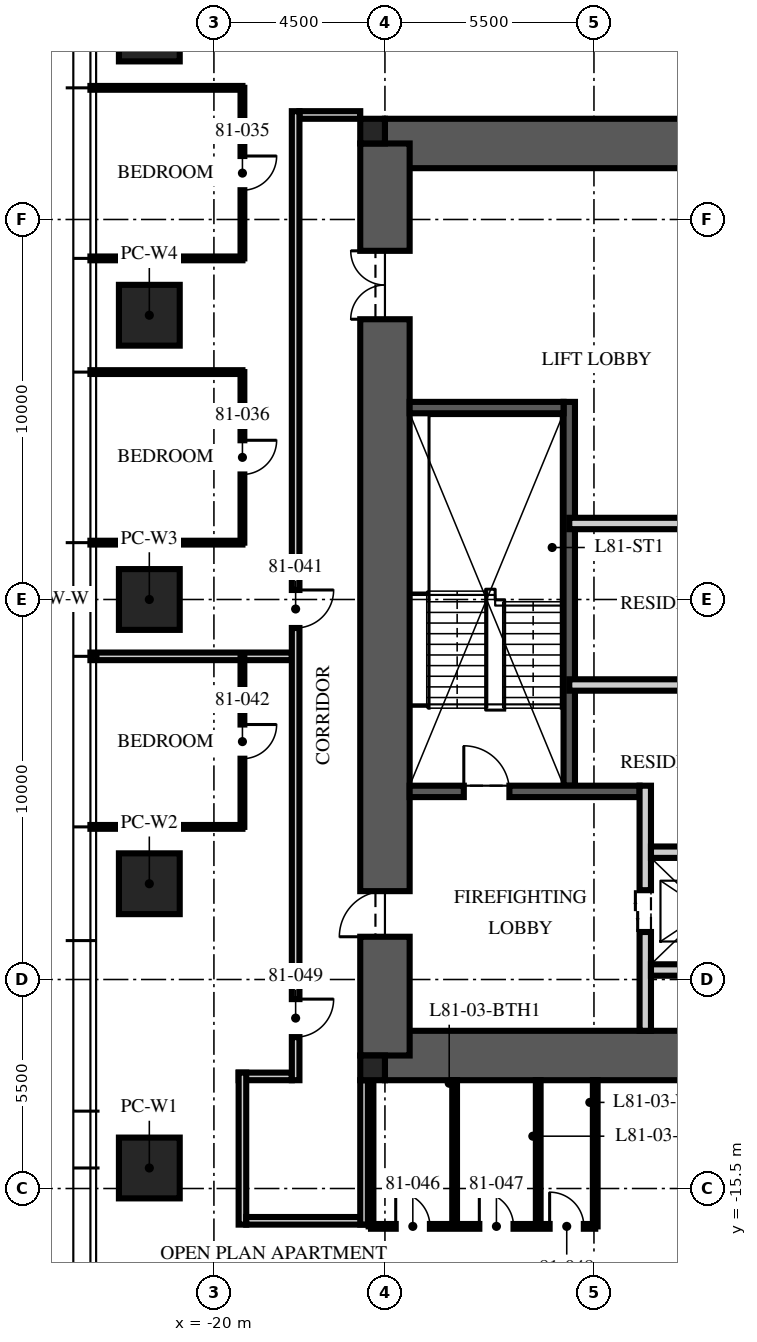
"""IFC4 building model, lengths in metres.
Left out: names, types, materials, properties, quantities, classifications, styles, units other than length and angle.
Written with IfcOpenShell. Run it as: python <this file> out.ifc"""

import sys

from ifc_helpers import new_model, si_unit, direction, frame, frame_2d, origin, origin_2d, place, context, subcontext, project, spatial, rectangle, extrude, element, fill, save


model = new_model("IFC4")
c1 = context("Model", 3, precision=1e-05, world=origin(), true_north=direction((0.0, 1.0)))
c2 = subcontext(c1, "Body", "Model", "MODEL_VIEW")
j1 = project(units=[si_unit("LENGTHUNIT", "METRE"), si_unit("PLANEANGLEUNIT", "RADIAN")], contexts=[c1])
p1 = place(None, origin())
s1 = spatial("IfcSite", under=j1, at=p1, CompositionType="ELEMENT")
p2 = place(p1, origin())
s2 = spatial("IfcBuilding", under=s1, at=p2, CompositionType="ELEMENT")
p3 = place(p2, frame((0.0, 0.0, 323.25)))
s3 = spatial("IfcBuildingStorey", under=s2, at=p3, CompositionType="ELEMENT", Elevation=323.25)
for number, where, z_axis, x_axis in (
    (1, (-15.5, 12.0, -0.25), (0.0, 0.0, 1.0), (1.0, 0.0, 0.0)),
    (2, (-15.5, -12.0, -0.25), (0.0, 0.0, 1.0), (1.0, 0.0, 0.0)),
):
    element("IfcWall", number, at=place(p3, frame(where, z_axis=z_axis, x_axis=x_axis)), inside=s3, PredefinedType="SHEAR", context=c2, shape_type="SweptSolid", body=[
        extrude(rectangle(XDim=31.0, YDim=1.3, at=frame_2d((15.5, 0.0))), origin(), (0.0, 0.0, 1.0), 3.75),
    ])
p4 = place(p3, frame((-15.5, -12.0, -0.25), z_axis=(0.0, 0.0, 1.0), x_axis=(0.0, 1.0, 0.0)))
e3 = element("IfcWall", 3, at=p4, inside=s3, PredefinedType="SHEAR", context=c2, shape_type="SweptSolid", body=[
    extrude(rectangle(XDim=24.0, YDim=1.3, at=frame_2d((12.0, 0.0))), origin(), (0.0, 0.0, 1.0), 3.75),
])
p5 = place(p4, frame((3.125, 0.0, 0.25)))
e4 = element("IfcOpeningElement", 4, at=p5, cuts=e3, PredefinedType="OPENING", context=c2, shape_type="SweptSolid", body=[
    extrude(rectangle(XDim=1.2, YDim=2.1, at=frame_2d((0.6, 1.05))), frame((0.0, 0.66, 0.0), z_axis=(0.0, -1.0, 0.0), x_axis=(1.0, 0.0, 0.0)), (0.0, 0.0, 1.0), 1.32),
])
p6 = place(p4, frame((19.375, 0.0, 0.25)))
e5 = element("IfcOpeningElement", 5, at=p6, cuts=e3, PredefinedType="OPENING", context=c2, shape_type="SweptSolid", body=[
    extrude(rectangle(XDim=1.8, YDim=2.1, at=frame_2d((0.9, 1.05))), frame((0.0, 0.66, 0.0), z_axis=(0.0, -1.0, 0.0), x_axis=(1.0, 0.0, 0.0)), (0.0, 0.0, 1.0), 1.32),
])
for number, where, z_axis, x_axis in (
    (6, (-15.825, 12.325, -0.25), (0.0, 0.0, 1.0), (1.0, 0.0, 0.0)),
    (7, (-15.825, -12.325, -0.25), (0.0, 0.0, 1.0), (1.0, 0.0, 0.0)),
):
    element("IfcColumn", number, at=place(p3, frame(where, z_axis=z_axis, x_axis=x_axis)), inside=s3, PredefinedType="COLUMN", context=c2, shape_type="SweptSolid", body=[
        extrude(rectangle(XDim=0.65, YDim=0.65, at=origin_2d()), origin(), (0.0, 0.0, 1.0), 3.75),
    ])
for number, where, z_axis, x_axis in (
    (8, (-21.7, -14.96, 0.0), (0.0, 0.0, 1.0), (0.0, 1.0, 0.0)),
    (9, (-21.7, -7.48, 0.0), (0.0, 0.0, 1.0), (0.0, 1.0, 0.0)),
    (10, (-21.7, 0.0, 0.0), (0.0, 0.0, 1.0), (0.0, 1.0, 0.0)),
    (11, (-21.7, 7.48, 0.0), (0.0, 0.0, 1.0), (0.0, 1.0, 0.0)),
    (12, (-21.7, 14.96, 0.0), (0.0, 0.0, 1.0), (0.0, 1.0, 0.0)),
):
    element("IfcColumn", number, at=place(p3, frame(where, z_axis=z_axis, x_axis=x_axis)), inside=s3, PredefinedType="COLUMN", context=c2, shape_type="SweptSolid", body=[
        extrude(rectangle(XDim=1.6, YDim=1.6, at=origin_2d()), origin(), (0.0, 0.0, 1.0), 3.75),
    ])
p7 = place(p3, frame((-10.65, -4.9, 0.0), z_axis=(0.0, 0.0, 1.0), x_axis=(0.0, 1.0, 0.0)))
e13 = element("IfcWall", 13, at=p7, inside=s3, PredefinedType="SOLIDWALL", context=c2, shape_type="SweptSolid", body=[
    extrude(rectangle(XDim=10.1, YDim=0.3, at=frame_2d((5.05, 0.0))), origin(), (0.0, 0.0, 1.0), 3.5),
])
p8 = place(p3, frame((-14.85, -5.05, 0.0), z_axis=(0.0, 0.0, 1.0), x_axis=(1.0, 0.0, 0.0)))
e14 = element("IfcWall", 14, at=p8, inside=s3, PredefinedType="SOLIDWALL", context=c2, shape_type="SweptSolid", body=[
    extrude(rectangle(XDim=6.05, YDim=0.3, at=frame_2d((3.025, 0.0))), origin(), (0.0, 0.0, 1.0), 3.5),
])
p9 = place(p8, frame((1.425, 0.0, 0.0)))
e15 = element("IfcOpeningElement", 15, at=p9, cuts=e14, PredefinedType="OPENING", context=c2, shape_type="SweptSolid", body=[
    extrude(rectangle(XDim=1.2, YDim=2.1, at=frame_2d((0.6, 1.05))), frame((0.0, 0.16, 0.0), z_axis=(0.0, -1.0, 0.0), x_axis=(1.0, 0.0, 0.0)), (0.0, 0.0, 1.0), 0.32),
])
p10 = place(p3, frame((-14.85, 5.05, 0.0), z_axis=(0.0, 0.0, 1.0), x_axis=(1.0, 0.0, 0.0)))
e16 = element("IfcWall", 16, at=p10, inside=s3, PredefinedType="SOLIDWALL", context=c2, shape_type="SweptSolid", body=[
    extrude(rectangle(XDim=4.05, YDim=0.3, at=frame_2d((2.025, 0.0))), origin(), (0.0, 0.0, 1.0), 3.5),
])
p11 = place(p3, frame((-8.65, -11.35, 0.0), z_axis=(0.0, 0.0, 1.0), x_axis=(0.0, 1.0, 0.0)))
e17 = element("IfcWall", 17, at=p11, inside=s3, PredefinedType="PARTITIONING", context=c2, shape_type="SweptSolid", body=[
    extrude(rectangle(XDim=6.45, YDim=0.3, at=frame_2d((3.225, 0.0))), origin(), (0.0, 0.0, 1.0), 3.5),
])
p12 = place(p11, frame((2.6, 0.0, 0.0)))
e18 = element("IfcOpeningElement", 18, at=p12, cuts=e17, PredefinedType="OPENING", context=c2, shape_type="SweptSolid", body=[
    extrude(rectangle(XDim=1.1, YDim=2.1, at=frame_2d((0.55, 1.05))), frame((0.0, 0.16, 0.0), z_axis=(0.0, -1.0, 0.0), x_axis=(1.0, 0.0, 0.0)), (0.0, 0.0, 1.0), 0.32),
])
p13 = place(p3, frame((-8.5, -6.65, 0.0), z_axis=(0.0, 0.0, 1.0), x_axis=(1.0, 0.0, 0.0)))
e19 = element("IfcWall", 19, at=p13, inside=s3, PredefinedType="PARTITIONING", context=c2, shape_type="SweptSolid", body=[
    extrude(rectangle(XDim=17.0, YDim=0.3, at=frame_2d((8.5, 0.0))), origin(), (0.0, 0.0, 1.0), 3.5),
])
p14 = place(p13, frame((7.8, 0.0, 0.0)))
e20 = element("IfcOpeningElement", 20, at=p14, cuts=e19, PredefinedType="OPENING", context=c2, shape_type="SweptSolid", body=[
    extrude(rectangle(XDim=1.3, YDim=2.4, at=frame_2d((0.65, 1.2))), frame((0.0, 0.16, 0.0), z_axis=(0.0, -1.0, 0.0), x_axis=(1.0, 0.0, 0.0)), (0.0, 0.0, 1.0), 0.32),
])
p15 = place(p13, frame((5.65, 0.0, 0.0)))
e21 = element("IfcOpeningElement", 21, at=p15, cuts=e19, PredefinedType="OPENING", context=c2, shape_type="SweptSolid", body=[
    extrude(rectangle(XDim=0.9, YDim=2.1, at=frame_2d((0.45, 1.05))), frame((0.0, 0.16, 0.0), z_axis=(0.0, -1.0, 0.0), x_axis=(1.0, 0.0, 0.0)), (0.0, 0.0, 1.0), 0.32),
])
p16 = place(p13, frame((10.4, 0.0, 0.0)))
e22 = element("IfcOpeningElement", 22, at=p16, cuts=e19, PredefinedType="OPENING", context=c2, shape_type="SweptSolid", body=[
    extrude(rectangle(XDim=0.9, YDim=2.1, at=frame_2d((0.45, 1.05))), frame((0.0, 0.16, 0.0), z_axis=(0.0, -1.0, 0.0), x_axis=(1.0, 0.0, 0.0)), (0.0, 0.0, 1.0), 0.32),
])
p17 = place(p3, frame((-8.5, -9.75, 0.0), z_axis=(0.0, 0.0, 1.0), x_axis=(1.0, 0.0, 0.0)))
e23 = element("IfcWall", 23, at=p17, inside=s3, PredefinedType="PARTITIONING", context=c2, shape_type="SweptSolid", body=[
    extrude(rectangle(XDim=2.9, YDim=0.3, at=frame_2d((1.45, 0.0))), origin(), (0.0, 0.0, 1.0), 3.5),
])
p18 = place(p3, frame((-10.65, 2.0, 0.0), z_axis=(0.0, 0.0, 1.0), x_axis=(1.0, 0.0, 0.0)))
e24 = element("IfcWall", 24, at=p18, inside=s3, PredefinedType="PARTITIONING", context=c2, shape_type="SweptSolid", body=[
    extrude(rectangle(XDim=21.3, YDim=0.3, at=frame_2d((10.65, 0.0))), origin(), (0.0, 0.0, 1.0), 3.5),
])
p19 = place(p18, frame((10.05, 0.0, 0.0)))
e25 = element("IfcOpeningElement", 25, at=p19, cuts=e24, PredefinedType="OPENING", context=c2, shape_type="SweptSolid", body=[
    extrude(rectangle(XDim=1.2, YDim=2.1, at=frame_2d((0.6, 1.05))), frame((0.0, 0.16, 0.0), z_axis=(0.0, -1.0, 0.0), x_axis=(1.0, 0.0, 0.0)), (0.0, 0.0, 1.0), 0.32),
])
p20 = place(p18, frame((18.942, 0.0, 0.0)))
e26 = element("IfcOpeningElement", 26, at=p20, cuts=e24, PredefinedType="OPENING", context=c2, shape_type="SweptSolid", body=[
    extrude(rectangle(XDim=0.9, YDim=2.1, at=frame_2d((0.45, 1.05))), frame((0.0, 0.16, 0.0), z_axis=(0.0, -1.0, 0.0), x_axis=(1.0, 0.0, 0.0)), (0.0, 0.0, 1.0), 0.32),
])
p21 = place(p3, frame((-10.65, -2.25, 0.0), z_axis=(0.0, 0.0, 1.0), x_axis=(1.0, 0.0, 0.0)))
e27 = element("IfcWall", 27, at=p21, inside=s3, PredefinedType="PARTITIONING", context=c2, shape_type="SweptSolid", body=[
    extrude(rectangle(XDim=7.35, YDim=0.3, at=frame_2d((3.675, 0.0))), origin(), (0.0, 0.0, 1.0), 3.5),
])
p22 = place(p3, frame((-17.95, -12.55, 0.0), z_axis=(0.0, 0.0, 1.0), x_axis=(-1.0, 0.0, 0.0)))
e28 = element("IfcWall", 28, at=p22, inside=s3, PredefinedType="PARTITIONING", context=c2, shape_type="SweptSolid", body=[
    extrude(rectangle(XDim=1.4, YDim=0.2, at=frame_2d((0.7, 0.0))), origin(), (0.0, 0.0, 1.0), 3.5),
])
p23 = place(p3, frame((-19.25, -12.45, 0.0), z_axis=(0.0, 0.0, 1.0), x_axis=(0.0, -1.0, 0.0)))
e29 = element("IfcWall", 29, at=p23, inside=s3, PredefinedType="PARTITIONING", context=c2, shape_type="SweptSolid", body=[
    extrude(rectangle(XDim=4.0, YDim=0.2, at=frame_2d((2.0, 0.0))), origin(), (0.0, 0.0, 1.0), 2.9),
])
p24 = place(p3, frame((-19.15, -16.35, 0.0), z_axis=(0.0, 0.0, 1.0), x_axis=(1.0, 0.0, 0.0)))
e30 = element("IfcWall", 30, at=p24, inside=s3, PredefinedType="PARTITIONING", context=c2, shape_type="SweptSolid", body=[
    extrude(rectangle(XDim=3.2, YDim=0.2, at=frame_2d((1.6, 0.0))), origin(), (0.0, 0.0, 1.0), 2.6),
])
p25 = place(p3, frame((-16.05, -16.45, 0.0), z_axis=(0.0, 0.0, 1.0), x_axis=(0.0, 1.0, 0.0)))
e31 = element("IfcWall", 31, at=p25, inside=s3, PredefinedType="PARTITIONING", context=c2, shape_type="SweptSolid", body=[
    extrude(rectangle(XDim=3.8, YDim=0.2, at=frame_2d((1.9, 0.0))), origin(), (0.0, 0.0, 1.0), 2.6),
])
p26 = place(p3, frame((-16.15, 12.75, 0.0), z_axis=(0.0, 0.0, 1.0), x_axis=(-1.0, 0.0, 0.0)))
e32 = element("IfcWall", 32, at=p26, inside=s3, PredefinedType="PARTITIONING", context=c2, shape_type="SweptSolid", body=[
    extrude(rectangle(XDim=1.6, YDim=0.2, at=frame_2d((0.8, 0.0))), origin(), (0.0, 0.0, 1.0), 2.6),
])
for number, where, z_axis, x_axis in (
    (33, (-19.25, 13.464, 0.0), (0.0, 0.0, 1.0), (-1.0, 0.0, 0.0)),
    (34, (-19.25, 8.976, 0.0), (0.0, 0.0, 1.0), (-1.0, 0.0, 0.0)),
    (35, (-19.25, 5.984, 0.0), (0.0, 0.0, 1.0), (-1.0, 0.0, 0.0)),
    (36, (-19.25, 1.496, 0.0), (0.0, 0.0, 1.0), (-1.0, 0.0, 0.0)),
):
    element("IfcWall", number, at=place(p3, frame(where, z_axis=z_axis, x_axis=x_axis)), inside=s3, PredefinedType="PARTITIONING", context=c2, shape_type="SweptSolid", body=[
        extrude(rectangle(XDim=4.0, YDim=0.1, at=frame_2d((2.0, 0.0))), origin(), (0.0, 0.0, 1.0), 3.01),
    ])
p27 = place(p3, frame((-17.95, -1.496, 0.0), z_axis=(0.0, 0.0, 1.0), x_axis=(-1.0, 0.0, 0.0)))
e37 = element("IfcWall", 37, at=p27, inside=s3, PredefinedType="PARTITIONING", context=c2, shape_type="SweptSolid", body=[
    extrude(rectangle(XDim=5.3, YDim=0.2, at=frame_2d((2.65, 0.0))), origin(), (0.0, 0.0, 1.0), 3.01),
])
p28 = place(p3, frame((-19.25, -5.984, 0.0), z_axis=(0.0, 0.0, 1.0), x_axis=(-1.0, 0.0, 0.0)))
e38 = element("IfcWall", 38, at=p28, inside=s3, PredefinedType="PARTITIONING", context=c2, shape_type="SweptSolid", body=[
    extrude(rectangle(XDim=4.0, YDim=0.1, at=frame_2d((2.0, 0.0))), origin(), (0.0, 0.0, 1.0), 3.01),
])
p29 = place(p3, frame((-19.25, 13.464, 0.0), z_axis=(0.0, 0.0, 1.0), x_axis=(0.0, -1.0, 0.0)))
e39 = element("IfcWall", 39, at=p29, inside=s3, PredefinedType="PARTITIONING", context=c2, shape_type="SweptSolid", body=[
    extrude(rectangle(XDim=4.488, YDim=0.1, at=frame_2d((2.244, 0.0))), origin(), (0.0, 0.0, 1.0), 2.91),
])
p30 = place(p29, frame((1.794, 0.0, 0.0)))
e40 = element("IfcOpeningElement", 40, at=p30, cuts=e39, PredefinedType="OPENING", context=c2, shape_type="SweptSolid", body=[
    extrude(rectangle(XDim=0.9, YDim=2.1, at=frame_2d((0.45, 1.05))), frame((0.0, 0.06, 0.0), z_axis=(0.0, -1.0, 0.0), x_axis=(1.0, 0.0, 0.0)), (0.0, 0.0, 1.0), 0.12),
])
p31 = place(p3, frame((-19.25, 5.984, 0.0), z_axis=(0.0, 0.0, 1.0), x_axis=(0.0, -1.0, 0.0)))
e41 = element("IfcWall", 41, at=p31, inside=s3, PredefinedType="PARTITIONING", context=c2, shape_type="SweptSolid", body=[
    extrude(rectangle(XDim=4.488, YDim=0.1, at=frame_2d((2.244, 0.0))), origin(), (0.0, 0.0, 1.0), 2.91),
])
p32 = place(p31, frame((1.794, 0.0, 0.0)))
e42 = element("IfcOpeningElement", 42, at=p32, cuts=e41, PredefinedType="OPENING", context=c2, shape_type="SweptSolid", body=[
    extrude(rectangle(XDim=0.9, YDim=2.1, at=frame_2d((0.45, 1.05))), frame((0.0, 0.06, 0.0), z_axis=(0.0, -1.0, 0.0), x_axis=(1.0, 0.0, 0.0)), (0.0, 0.0, 1.0), 0.12),
])
p33 = place(p3, frame((-19.25, -1.496, 0.0), z_axis=(0.0, 0.0, 1.0), x_axis=(0.0, -1.0, 0.0)))
e43 = element("IfcWall", 43, at=p33, inside=s3, PredefinedType="PARTITIONING", context=c2, shape_type="SweptSolid", body=[
    extrude(rectangle(XDim=4.488, YDim=0.1, at=frame_2d((2.244, 0.0))), origin(), (0.0, 0.0, 1.0), 2.91),
])
p34 = place(p33, frame((1.794, 0.0, 0.0)))
e44 = element("IfcOpeningElement", 44, at=p34, cuts=e43, PredefinedType="OPENING", context=c2, shape_type="SweptSolid", body=[
    extrude(rectangle(XDim=0.9, YDim=2.1, at=frame_2d((0.45, 1.05))), frame((0.0, 0.06, 0.0), z_axis=(0.0, -1.0, 0.0), x_axis=(1.0, 0.0, 0.0)), (0.0, 0.0, 1.0), 0.12),
])
p35 = place(p3, frame((-15.866, -16.496, 0.0), z_axis=(0.0, 0.0, 1.0), x_axis=(1.0, 0.0, 0.0)))
e45 = element("IfcWall", 45, at=p35, inside=s3, PredefinedType="PARTITIONING", context=c2, shape_type="SweptSolid", body=[
    extrude(rectangle(XDim=5.9, YDim=0.125, at=frame_2d((2.95, 0.0))), origin(), (0.0, 0.0, 1.0), 2.9),
])
p36 = place(p35, frame((0.65, 0.0, 0.0)))
e46 = element("IfcOpeningElement", 46, at=p36, cuts=e45, PredefinedType="OPENING", context=c2, shape_type="SweptSolid", body=[
    extrude(rectangle(XDim=0.9, YDim=2.1, at=frame_2d((0.45, 1.05))), frame((0.0, 0.073, 0.0), z_axis=(0.0, -1.0, 0.0), x_axis=(1.0, 0.0, 0.0)), (0.0, 0.0, 1.0), 0.145),
])
p37 = place(p35, frame((2.85, 0.0, 0.0)))
e47 = element("IfcOpeningElement", 47, at=p37, cuts=e45, PredefinedType="OPENING", context=c2, shape_type="SweptSolid", body=[
    extrude(rectangle(XDim=0.9, YDim=2.1, at=frame_2d((0.45, 1.05))), frame((0.0, 0.073, 0.0), z_axis=(0.0, -1.0, 0.0), x_axis=(1.0, 0.0, 0.0)), (0.0, 0.0, 1.0), 0.145),
])
p38 = place(p35, frame((4.7, 0.0, 0.0)))
e48 = element("IfcOpeningElement", 48, at=p38, cuts=e45, PredefinedType="OPENING", context=c2, shape_type="SweptSolid", body=[
    extrude(rectangle(XDim=0.9, YDim=2.1, at=frame_2d((0.45, 1.05))), frame((0.0, 0.073, 0.0), z_axis=(0.0, -1.0, 0.0), x_axis=(1.0, 0.0, 0.0)), (0.0, 0.0, 1.0), 0.145),
])
p39 = place(p3, frame((-15.866, -12.65, 0.0), z_axis=(0.0, 0.0, 1.0), x_axis=(0.0, -1.0, 0.0)))
e49 = element("IfcWall", 49, at=p39, inside=s3, PredefinedType="PARTITIONING", context=c2, shape_type="SweptSolid", body=[
    extrude(rectangle(XDim=3.846, YDim=0.125, at=frame_2d((1.923, 0.0))), origin(), (0.0, 0.0, 1.0), 2.6),
])
for number, where, z_axis, x_axis in (
    (50, (-13.667, -12.65, 0.0), (0.0, 0.0, 1.0), (0.0, -1.0, 0.0)),
    (51, (-11.467, -12.65, 0.0), (0.0, 0.0, 1.0), (0.0, -1.0, 0.0)),
    (52, (-9.967, -12.65, 0.0), (0.0, 0.0, 1.0), (0.0, -1.0, 0.0)),
):
    element("IfcWall", number, at=place(p3, frame(where, z_axis=z_axis, x_axis=x_axis)), inside=s3, PredefinedType="PARTITIONING", context=c2, shape_type="SweptSolid", body=[
        extrude(rectangle(XDim=3.846, YDim=0.125, at=frame_2d((1.923, 0.0))), origin(), (0.0, 0.0, 1.0), 3.5),
    ])
p40 = place(p3, frame((-17.85, 12.85, 0.0), z_axis=(0.0, 0.0, 1.0), x_axis=(0.0, -1.0, 0.0)))
e53 = element("IfcWall", 53, at=p40, inside=s3, PredefinedType="PARTITIONING", context=c2, shape_type="SweptSolid", body=[
    extrude(rectangle(XDim=25.5, YDim=0.2, at=frame_2d((12.75, 0.0))), origin(), (0.0, 0.0, 1.0), 2.9),
])
p41 = place(p40, frame((12.6, 0.0, 0.0)))
e54 = element("IfcOpeningElement", 54, at=p41, cuts=e53, PredefinedType="OPENING", context=c2, shape_type="SweptSolid", body=[
    extrude(rectangle(XDim=1.0, YDim=2.2, at=frame_2d((0.5, 1.1))), frame((0.0, 0.11, 0.0), z_axis=(0.0, -1.0, 0.0), x_axis=(1.0, 0.0, 0.0)), (0.0, 0.0, 1.0), 0.22),
])
p42 = place(p40, frame((23.366, 0.0, 0.0)))
e55 = element("IfcOpeningElement", 55, at=p42, cuts=e53, PredefinedType="OPENING", context=c2, shape_type="SweptSolid", body=[
    extrude(rectangle(XDim=1.0, YDim=2.2, at=frame_2d((0.5, 1.1))), frame((0.0, 0.11, 0.0), z_axis=(0.0, -1.0, 0.0), x_axis=(1.0, 0.0, 0.0)), (0.0, 0.0, 1.0), 0.22),
])
p43 = place(p9, origin())
e56 = element("IfcDoor", 56, at=p43, inside=s3, OperationType="SINGLE_SWING_LEFT", PredefinedType="DOOR", context=c2, shape_type="SweptSolid", body=[
    extrude(rectangle(XDim=1.2, YDim=2.1, at=frame_2d((0.6, 1.05))), frame((0.0, 0.025, 0.0), z_axis=(0.0, -1.0, 0.0), x_axis=(1.0, 0.0, 0.0)), (0.0, 0.0, 1.0), 0.05),
])
fill(e15, e56)
p44 = place(p5, origin())
e57 = element("IfcDoor", 57, at=p44, inside=s3, OperationType="SINGLE_SWING_LEFT", PredefinedType="DOOR", context=c2, shape_type="SweptSolid", body=[
    extrude(rectangle(XDim=1.2, YDim=2.1, at=frame_2d((0.6, 1.05))), frame((0.0, 0.025, 0.0), z_axis=(0.0, -1.0, 0.0), x_axis=(1.0, 0.0, 0.0)), (0.0, 0.0, 1.0), 0.05),
])
fill(e4, e57)
p45 = place(p6, origin())
e58 = element("IfcDoor", 58, at=p45, inside=s3, OperationType="DOUBLE_DOOR_SINGLE_SWING", PredefinedType="DOOR", context=c2, shape_type="SweptSolid", body=[
    extrude(rectangle(XDim=1.8, YDim=2.1, at=frame_2d((0.9, 1.05))), frame((0.0, 0.025, 0.0), z_axis=(0.0, -1.0, 0.0), x_axis=(1.0, 0.0, 0.0)), (0.0, 0.0, 1.0), 0.05),
])
fill(e5, e58)
p46 = place(p12, origin())
e59 = element("IfcDoor", 59, at=p46, inside=s3, OperationType="DOUBLE_DOOR_SLIDING", PredefinedType="DOOR", context=c2, shape_type="SweptSolid", body=[
    extrude(rectangle(XDim=1.1, YDim=2.1, at=frame_2d((0.55, 1.05))), frame((0.0, 0.025, 0.0), z_axis=(0.0, -1.0, 0.0), x_axis=(1.0, 0.0, 0.0)), (0.0, 0.0, 1.0), 0.05),
])
fill(e18, e59)
p47 = place(p30, origin())
e60 = element("IfcDoor", 60, at=p47, inside=s3, OperationType="SINGLE_SWING_LEFT", PredefinedType="DOOR", context=c2, shape_type="SweptSolid", body=[
    extrude(rectangle(XDim=0.9, YDim=2.1, at=frame_2d((0.45, 1.05))), frame((0.0, 0.025, 0.0), z_axis=(0.0, -1.0, 0.0), x_axis=(1.0, 0.0, 0.0)), (0.0, 0.0, 1.0), 0.05),
])
fill(e40, e60)
p48 = place(p32, origin())
e61 = element("IfcDoor", 61, at=p48, inside=s3, OperationType="SINGLE_SWING_LEFT", PredefinedType="DOOR", context=c2, shape_type="SweptSolid", body=[
    extrude(rectangle(XDim=0.9, YDim=2.1, at=frame_2d((0.45, 1.05))), frame((0.0, 0.025, 0.0), z_axis=(0.0, -1.0, 0.0), x_axis=(1.0, 0.0, 0.0)), (0.0, 0.0, 1.0), 0.05),
])
fill(e42, e61)
p49 = place(p41, origin())
e62 = element("IfcDoor", 62, at=p49, inside=s3, OperationType="SINGLE_SWING_LEFT", PredefinedType="DOOR", context=c2, shape_type="SweptSolid", body=[
    extrude(rectangle(XDim=1.0, YDim=2.2, at=frame_2d((0.5, 1.1))), frame((0.0, 0.025, 0.0), z_axis=(0.0, -1.0, 0.0), x_axis=(1.0, 0.0, 0.0)), (0.0, 0.0, 1.0), 0.05),
])
fill(e54, e62)
p50 = place(p34, origin())
e63 = element("IfcDoor", 63, at=p50, inside=s3, OperationType="SINGLE_SWING_LEFT", PredefinedType="DOOR", context=c2, shape_type="SweptSolid", body=[
    extrude(rectangle(XDim=0.9, YDim=2.1, at=frame_2d((0.45, 1.05))), frame((0.0, 0.025, 0.0), z_axis=(0.0, -1.0, 0.0), x_axis=(1.0, 0.0, 0.0)), (0.0, 0.0, 1.0), 0.05),
])
fill(e44, e63)
p51 = place(p36, origin())
e64 = element("IfcDoor", 64, at=p51, inside=s3, OperationType="SINGLE_SWING_LEFT", PredefinedType="DOOR", context=c2, shape_type="SweptSolid", body=[
    extrude(rectangle(XDim=0.9, YDim=2.1, at=frame_2d((0.45, 1.05))), frame((0.0, 0.025, 0.0), z_axis=(0.0, -1.0, 0.0), x_axis=(1.0, 0.0, 0.0)), (0.0, 0.0, 1.0), 0.05),
])
fill(e46, e64)
p52 = place(p37, origin())
e65 = element("IfcDoor", 65, at=p52, inside=s3, OperationType="SINGLE_SWING_LEFT", PredefinedType="DOOR", context=c2, shape_type="SweptSolid", body=[
    extrude(rectangle(XDim=0.9, YDim=2.1, at=frame_2d((0.45, 1.05))), frame((0.0, 0.025, 0.0), z_axis=(0.0, -1.0, 0.0), x_axis=(1.0, 0.0, 0.0)), (0.0, 0.0, 1.0), 0.05),
])
fill(e47, e65)
p53 = place(p38, origin())
e66 = element("IfcDoor", 66, at=p53, inside=s3, OperationType="SINGLE_SWING_LEFT", PredefinedType="DOOR", context=c2, shape_type="SweptSolid", body=[
    extrude(rectangle(XDim=0.9, YDim=2.1, at=frame_2d((0.45, 1.05))), frame((0.0, 0.025, 0.0), z_axis=(0.0, -1.0, 0.0), x_axis=(1.0, 0.0, 0.0)), (0.0, 0.0, 1.0), 0.05),
])
fill(e48, e66)
p54 = place(p42, origin())
e67 = element("IfcDoor", 67, at=p54, inside=s3, OperationType="SINGLE_SWING_LEFT", PredefinedType="DOOR", context=c2, shape_type="SweptSolid", body=[
    extrude(rectangle(XDim=1.0, YDim=2.2, at=frame_2d((0.5, 1.1))), frame((0.0, 0.025, 0.0), z_axis=(0.0, -1.0, 0.0), x_axis=(1.0, 0.0, 0.0)), (0.0, 0.0, 1.0), 0.05),
])
fill(e55, e67)
save(model, sys.argv[1])
